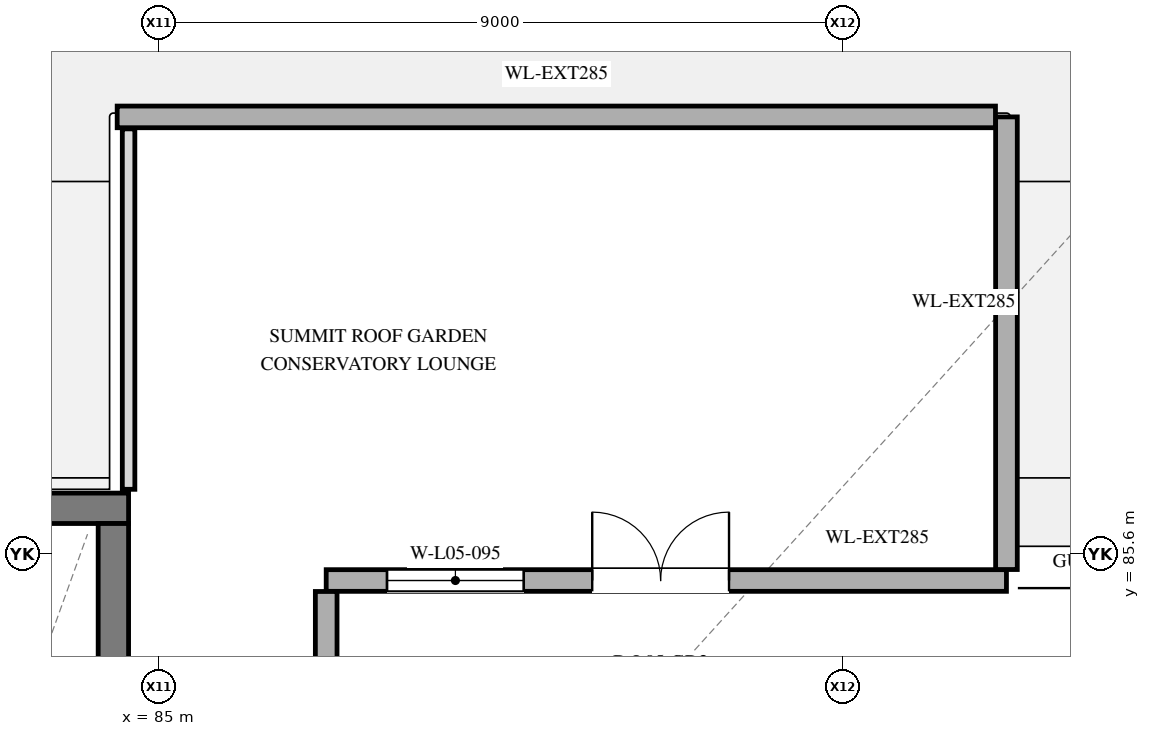
"""IFC4 building model, lengths in metres.
Left out: names, types, materials, properties, quantities, classifications, styles, units other than length and angle.
Written with IfcOpenShell. Run it as: python <this file> out.ifc"""

import sys

from ifc_helpers import new_model, si_unit, direction, frame, frame_2d, origin, place, context, subcontext, project, spatial, rectangle, extrude, element, fill, save


model = new_model("IFC4")
c1 = context("Model", 3, precision=1e-05, world=origin(), true_north=direction((0.0, 1.0)))
c2 = subcontext(c1, "Body", "Model", "MODEL_VIEW")
j1 = project(units=[si_unit("LENGTHUNIT", "METRE"), si_unit("PLANEANGLEUNIT", "RADIAN")], contexts=[c1])
p1 = place(None, origin())
s1 = spatial("IfcSite", under=j1, at=p1, CompositionType="ELEMENT")
p2 = place(p1, origin())
s2 = spatial("IfcBuilding", under=s1, at=p2, CompositionType="ELEMENT")
p3 = place(p2, frame((0.0, 0.0, 23.4)))
s3 = spatial("IfcBuildingStorey", under=s2, at=p3, CompositionType="ELEMENT", Elevation=23.4)
p4 = place(p3, frame((87.2, 85.25, 0.0), z_axis=(0.0, 0.0, 1.0), x_axis=(1.0, 0.0, 0.0)))
e1 = element("IfcWall", 1, at=p4, inside=s3, PredefinedType="STANDARD", context=c2, shape_type="SweptSolid", body=[
    extrude(rectangle(XDim=8.95, YDim=0.285, at=frame_2d((4.475, 0.0))), origin(), (0.0, 0.0, 1.0), 2.8),
])
p5 = place(p4, frame((3.5, 0.0, 0.0)))
e2 = element("IfcOpeningElement", 2, at=p5, cuts=e1, PredefinedType="OPENING", context=c2, shape_type="SweptSolid", body=[
    extrude(rectangle(XDim=1.8, YDim=2.3, at=frame_2d((0.9, 1.15))), frame((0.0, 0.152, 0.0), z_axis=(0.0, -1.0, 0.0), x_axis=(1.0, 0.0, 0.0)), (0.0, 0.0, 1.0), 0.305),
])
p6 = place(p4, frame((0.8, 0.0, 0.25)))
e3 = element("IfcOpeningElement", 3, at=p6, cuts=e1, PredefinedType="OPENING", context=c2, shape_type="SweptSolid", body=[
    extrude(rectangle(XDim=1.8, YDim=1.8, at=frame_2d((0.9, 0.9))), frame((0.0, 0.152, 0.0), z_axis=(0.0, -1.0, 0.0), x_axis=(1.0, 0.0, 0.0)), (0.0, 0.0, 1.0), 0.305),
])
p7 = place(p3, frame((87.2, 73.895, 0.0), z_axis=(0.0, 0.0, 1.0), x_axis=(0.0, 1.0, 0.0)))
e4 = element("IfcWall", 4, at=p7, inside=s3, PredefinedType="STANDARD", context=c2, shape_type="SweptSolid", body=[
    extrude(rectangle(XDim=11.211, YDim=0.285, at=frame_2d((5.605, 0.0))), origin(), (0.0, 0.0, 1.0), 2.8),
])
p8 = place(p3, frame((96.15, 85.395, 0.0), z_axis=(0.0, 0.0, 1.0), x_axis=(0.0, 1.0, 0.0)))
e5 = element("IfcWall", 5, at=p8, inside=s3, PredefinedType="STANDARD", context=c2, shape_type="SweptSolid", body=[
    extrude(rectangle(XDim=5.956, YDim=0.285, at=frame_2d((2.978, 0.0))), origin(), (0.0, 0.0, 1.0), 2.8),
])
p9 = place(p3, frame((96.006, 91.35, 0.0), z_axis=(0.0, 0.0, 1.0), x_axis=(-1.0, 0.0, 0.0)))
e6 = element("IfcWall", 6, at=p9, inside=s3, PredefinedType="STANDARD", context=c2, shape_type="SweptSolid", body=[
    extrude(rectangle(XDim=11.556, YDim=0.285, at=frame_2d((5.778, 0.0))), origin(), (0.0, 0.0, 1.0), 2.8),
])
p10 = place(p3, frame((84.6, 86.2, 0.0), z_axis=(0.0, 0.0, 1.0), x_axis=(-1.0, 0.0, 0.0)))
e7 = element("IfcWall", 7, at=p10, inside=s3, PredefinedType="SHEAR", context=c2, shape_type="SweptSolid", body=[
    extrude(rectangle(XDim=8.4, YDim=0.4, at=frame_2d((4.2, 0.0))), origin(), (0.0, 0.0, 1.0), 2.22),
])
p11 = place(p3, frame((84.4, 76.6, 0.0), z_axis=(0.0, 0.0, 1.0), x_axis=(0.0, 1.0, 0.0)))
e8 = element("IfcWall", 8, at=p11, inside=s3, PredefinedType="SHEAR", context=c2, shape_type="SweptSolid", body=[
    extrude(rectangle(XDim=9.4, YDim=0.4, at=frame_2d((4.7, 0.0))), origin(), (0.0, 0.0, 1.0), 2.22),
])
p12 = place(p3, frame((84.6, 86.45, 0.0), z_axis=(0.0, 0.0, 1.0), x_axis=(0.0, 1.0, 0.0)))
e9 = element("IfcWall", 9, at=p12, inside=s3, PredefinedType="PARTITIONING", context=c2, shape_type="SweptSolid", body=[
    extrude(rectangle(XDim=4.742, YDim=0.165, at=frame_2d((2.371, 0.0))), origin(), (0.0, 0.0, 1.0), 2.765),
])
p13 = place(p5, origin())
e10 = element("IfcDoor", 10, at=p13, inside=s3, OperationType="DOUBLE_DOOR_SINGLE_SWING", PredefinedType="DOOR", context=c2, shape_type="SweptSolid", body=[
    extrude(rectangle(XDim=1.8, YDim=2.3, at=frame_2d((0.9, 1.15))), frame((0.0, 0.025, 0.0), z_axis=(0.0, -1.0, 0.0), x_axis=(1.0, 0.0, 0.0)), (0.0, 0.0, 1.0), 0.05),
])
fill(e2, e10)
p14 = place(p6, origin())
e11 = element("IfcWindow", 11, at=p14, inside=s3, PartitioningType="SINGLE_PANEL", PredefinedType="WINDOW", context=c2, shape_type="SweptSolid", body=[
    extrude(rectangle(XDim=1.8, YDim=1.8, at=frame_2d((0.9, 0.9))), frame((0.0, 0.03, 0.0), z_axis=(0.0, -1.0, 0.0), x_axis=(1.0, 0.0, 0.0)), (0.0, 0.0, 1.0), 0.06),
])
fill(e3, e11)
save(model, sys.argv[1])
